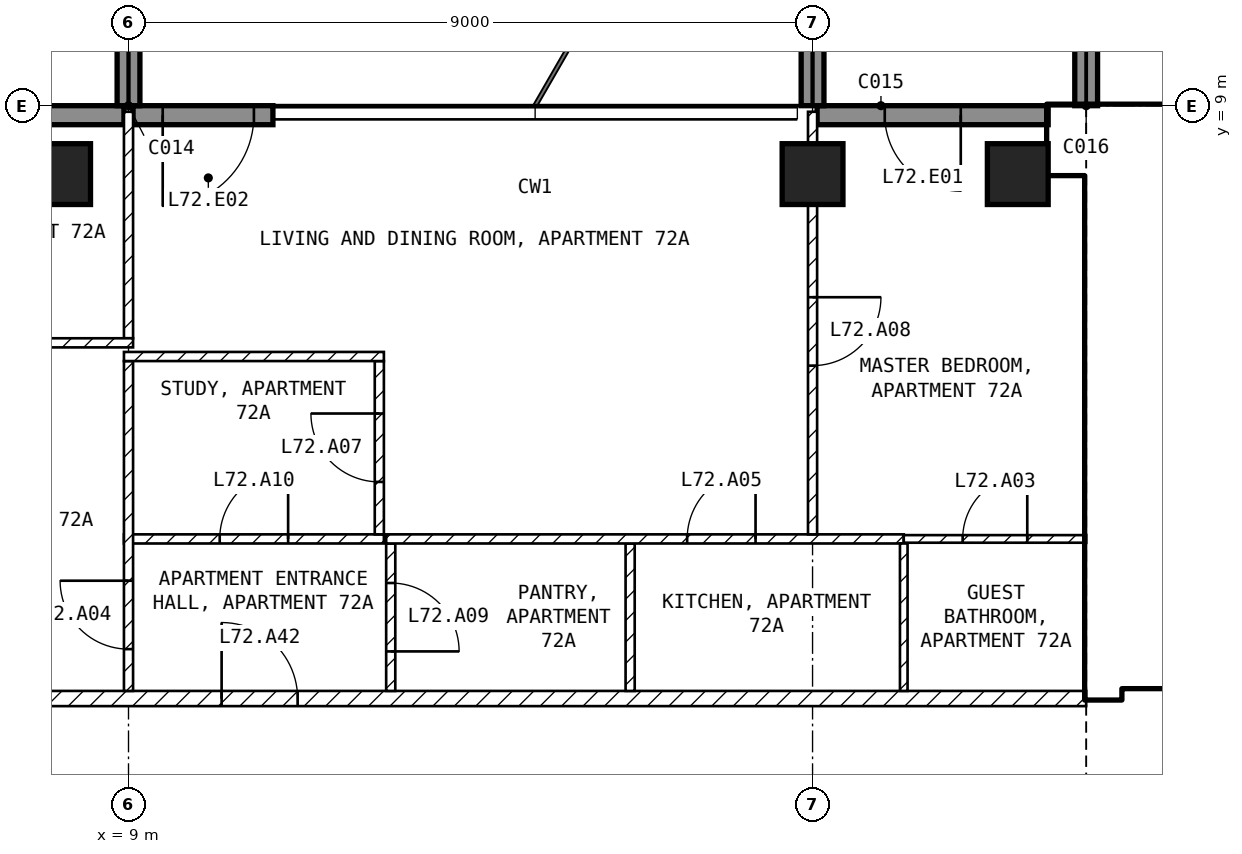
"""IFC4 building model, lengths in metres.
Left out: names, types, materials, properties, quantities, classifications, styles, units other than length and angle.
Written with IfcOpenShell. Run it as: python <this file> out.ifc"""

import sys

from ifc_helpers import new_model, si_unit, direction, frame, frame_2d, origin, origin_2d, place, context, subcontext, project, spatial, rectangle, extrude, element, fill, save


model = new_model("IFC4")
c1 = context("Model", 3, precision=1e-05, world=origin(), true_north=direction((0.0, 1.0)))
c2 = subcontext(c1, "Body", "Model", "MODEL_VIEW")
j1 = project(units=[si_unit("LENGTHUNIT", "METRE"), si_unit("PLANEANGLEUNIT", "RADIAN")], contexts=[c1])
p1 = place(None, origin())
s1 = spatial("IfcSite", under=j1, at=p1, CompositionType="ELEMENT")
p2 = place(p1, origin())
s2 = spatial("IfcBuilding", under=s1, at=p2, CompositionType="ELEMENT")
p3 = place(p2, frame((0.0, 0.0, 281.5)))
s3 = spatial("IfcBuildingStorey", under=s2, at=p3, CompositionType="ELEMENT", Elevation=281.5)
for number, where, z_axis, x_axis in (
    (1, (8.1, 8.1, -0.25), (0.0, 0.0, 1.0), (1.0, 0.0, 0.0)),
    (2, (18.0, 8.1, -0.25), (0.0, 0.0, 1.0), (1.0, 0.0, 0.0)),
    (3, (20.7, 8.1, -0.25), (0.0, 0.0, 1.0), (1.0, 0.0, 0.0)),
):
    element("IfcColumn", number, at=place(p3, frame(where, z_axis=z_axis, x_axis=x_axis)), inside=s3, PredefinedType="COLUMN", context=c2, shape_type="SweptSolid", body=[
        extrude(rectangle(XDim=0.8, YDim=0.8, at=origin_2d()), origin(), (0.0, 0.0, 1.0), 3.45),
    ])
p4 = place(p3, frame((21.1, 8.875, 0.0), z_axis=(0.0, 0.0, 1.0), x_axis=(-1.0, 0.0, 0.0)))
e4 = element("IfcWall", 4, at=p4, inside=s3, PredefinedType="SOLIDWALL", context=c2, shape_type="SweptSolid", body=[
    extrude(rectangle(XDim=3.04, YDim=0.25, at=frame_2d((1.52, 0.0))), origin(), (0.0, 0.0, 1.0), 3.2),
])
p5 = place(p4, frame((1.15, 0.0, 0.0)))
e5 = element("IfcOpeningElement", 5, at=p5, cuts=e4, PredefinedType="OPENING", context=c2, shape_type="SweptSolid", body=[
    extrude(rectangle(XDim=1.0, YDim=2.4, at=frame_2d((0.5, 1.2))), frame((0.0, 0.135, 0.0), z_axis=(0.0, -1.0, 0.0), x_axis=(1.0, 0.0, 0.0)), (0.0, 0.0, 1.0), 0.27),
])
p6 = place(p3, frame((10.9, 8.875, 0.0), z_axis=(0.0, 0.0, 1.0), x_axis=(-1.0, 0.0, 0.0)))
e6 = element("IfcWall", 6, at=p6, inside=s3, PredefinedType="SOLIDWALL", context=c2, shape_type="SweptSolid", body=[
    extrude(rectangle(XDim=1.84, YDim=0.25, at=frame_2d((0.92, 0.0))), origin(), (0.0, 0.0, 1.0), 3.2),
])
p7 = place(p6, frame((0.25, 0.0, 0.0)))
e7 = element("IfcOpeningElement", 7, at=p7, cuts=e6, PredefinedType="OPENING", context=c2, shape_type="SweptSolid", body=[
    extrude(rectangle(XDim=1.2, YDim=2.4, at=frame_2d((0.6, 1.2))), frame((0.0, 0.135, 0.0), z_axis=(0.0, -1.0, 0.0), x_axis=(1.0, 0.0, 0.0)), (0.0, 0.0, 1.0), 0.27),
])
p8 = place(p3, frame((8.94, 8.875, 0.0), z_axis=(0.0, 0.0, 1.0), x_axis=(-1.0, 0.0, 0.0)))
e8 = element("IfcWall", 8, at=p8, inside=s3, PredefinedType="SOLIDWALL", context=c2, shape_type="SweptSolid", body=[
    extrude(rectangle(XDim=3.04, YDim=0.25, at=frame_2d((1.52, 0.0))), origin(), (0.0, 0.0, 1.0), 3.2),
])
p9 = place(p8, frame((1.59, 0.0, 0.0)))
e9 = element("IfcOpeningElement", 9, at=p9, cuts=e8, PredefinedType="OPENING", context=c2, shape_type="SweptSolid", body=[
    extrude(rectangle(XDim=1.2, YDim=2.4, at=frame_2d((0.6, 1.2))), frame((0.0, 0.135, 0.0), z_axis=(0.0, -1.0, 0.0), x_axis=(1.0, 0.0, 0.0)), (0.0, 0.0, 1.0), 0.27),
])
for number, where, z_axis, x_axis in (
    (10, (9.0, 9.0, 0.0), (0.0, 0.0, 1.0), (0.0, 1.0, 0.0)),
    (11, (18.0, 9.0, 0.0), (0.0, 0.0, 1.0), (0.0, 1.0, 0.0)),
    (12, (21.6, 9.0, 0.0), (0.0, 0.0, 1.0), (0.0, 1.0, 0.0)),
):
    element("IfcWall", number, at=place(p3, frame(where, z_axis=z_axis, x_axis=x_axis)), inside=s3, PredefinedType="SOLIDWALL", context=c2, shape_type="SweptSolid", body=[
        extrude(rectangle(XDim=2.7, YDim=0.3, at=frame_2d((1.35, 0.0))), origin(), (0.0, 0.0, 1.0), 3.2),
    ])
p10 = place(p3, frame((21.1, 8.55, 0.0), z_axis=(0.0, 0.0, 1.0), x_axis=(1.0, 0.0, 0.0)))
e13 = element("IfcWall", 13, at=p10, inside=s3, PredefinedType="SHEAR", context=c2, shape_type="SweptSolid", body=[
    extrude(rectangle(XDim=8.65, YDim=0.9, at=frame_2d((4.325, 0.0))), origin(), (0.0, 0.0, 1.0), 3.2),
])
p11 = place(p3, frame((21.825, 1.2, 0.0), z_axis=(0.0, 0.0, 1.0), x_axis=(0.0, 1.0, 0.0)))
e14 = element("IfcWall", 14, at=p11, inside=s3, PredefinedType="SHEAR", context=c2, shape_type="SweptSolid", body=[
    extrude(rectangle(XDim=6.9, YDim=0.45, at=frame_2d((3.45, 0.0))), origin(), (0.0, 0.0, 1.0), 3.2),
])
p12 = place(p3, frame((22.05, 1.45, 0.0), z_axis=(0.0, 0.0, 1.0), x_axis=(1.0, 0.0, 0.0)))
e15 = element("IfcWall", 15, at=p12, inside=s3, PredefinedType="SOLIDWALL", context=c2, shape_type="SweptSolid", body=[
    extrude(rectangle(XDim=11.3, YDim=0.2, at=frame_2d((5.65, 0.0))), origin(), (0.0, 0.0, 1.0), 3.2),
])
p13 = place(p12, frame((0.75, 0.0, 0.0)))
e16 = element("IfcOpeningElement", 16, at=p13, cuts=e15, PredefinedType="OPENING", context=c2, shape_type="SweptSolid", body=[
    extrude(rectangle(XDim=1.0, YDim=2.1, at=frame_2d((0.5, 1.05))), frame((0.0, 0.11, 0.0), z_axis=(0.0, -1.0, 0.0), x_axis=(1.0, 0.0, 0.0)), (0.0, 0.0, 1.0), 0.22),
])
p14 = place(p12, frame((3.25, 0.0, 0.0)))
e17 = element("IfcOpeningElement", 17, at=p14, cuts=e15, PredefinedType="OPENING", context=c2, shape_type="SweptSolid", body=[
    extrude(rectangle(XDim=1.0, YDim=2.1, at=frame_2d((0.5, 1.05))), frame((0.0, 0.11, 0.0), z_axis=(0.0, -1.0, 0.0), x_axis=(1.0, 0.0, 0.0)), (0.0, 0.0, 1.0), 0.22),
])
p15 = place(p12, frame((9.225, 0.0, 0.0)))
e18 = element("IfcOpeningElement", 18, at=p15, cuts=e15, PredefinedType="OPENING", context=c2, shape_type="SweptSolid", body=[
    extrude(rectangle(XDim=0.9, YDim=2.1, at=frame_2d((0.45, 1.05))), frame((0.0, 0.11, 0.0), z_axis=(0.0, -1.0, 0.0), x_axis=(1.0, 0.0, 0.0)), (0.0, 0.0, 1.0), 0.22),
])
p16 = place(p3, frame((22.05, 5.15, 0.0), z_axis=(0.0, 0.0, 1.0), x_axis=(1.0, 0.0, 0.0)))
e19 = element("IfcWall", 19, at=p16, inside=s3, PredefinedType="SOLIDWALL", context=c2, shape_type="SweptSolid", body=[
    extrude(rectangle(XDim=6.3, YDim=0.2, at=frame_2d((3.15, 0.0))), origin(), (0.0, 0.0, 1.0), 3.2),
])
p17 = place(p16, frame((0.2, 0.0, 0.0)))
e20 = element("IfcOpeningElement", 20, at=p17, cuts=e19, PredefinedType="OPENING", context=c2, shape_type="SweptSolid", body=[
    extrude(rectangle(XDim=1.0, YDim=2.1, at=frame_2d((0.5, 1.05))), frame((0.0, 0.11, 0.0), z_axis=(0.0, -1.0, 0.0), x_axis=(1.0, 0.0, 0.0)), (0.0, 0.0, 1.0), 0.22),
])
p18 = place(p3, frame((4.4, 1.2, 0.0), z_axis=(0.0, 0.0, 1.0), x_axis=(1.0, 0.0, 0.0)))
e21 = element("IfcWall", 21, at=p18, inside=s3, PredefinedType="PARTITIONING", context=c2, shape_type="SweptSolid", body=[
    extrude(rectangle(XDim=17.2, YDim=0.2, at=frame_2d((8.6, 0.0))), origin(), (0.0, 0.0, 1.0), 3.2),
])
p19 = place(p18, frame((5.825, 0.0, 0.0)))
e22 = element("IfcOpeningElement", 22, at=p19, cuts=e21, PredefinedType="OPENING", context=c2, shape_type="SweptSolid", body=[
    extrude(rectangle(XDim=1.0, YDim=2.1, at=frame_2d((0.5, 1.05))), frame((0.0, 0.11, 0.0), z_axis=(0.0, -1.0, 0.0), x_axis=(1.0, 0.0, 0.0)), (0.0, 0.0, 1.0), 0.22),
])
p20 = place(p3, frame((12.45, 3.24, 0.0), z_axis=(0.0, 0.0, 1.0), x_axis=(0.0, -1.0, 0.0)))
e23 = element("IfcWall", 23, at=p20, inside=s3, PredefinedType="PARTITIONING", context=c2, shape_type="SweptSolid", body=[
    extrude(rectangle(XDim=1.94, YDim=0.12, at=frame_2d((0.97, 0.0))), origin(), (0.0, 0.0, 1.0), 3.2),
])
p21 = place(p20, frame((0.52, 0.0, 0.0)))
e24 = element("IfcOpeningElement", 24, at=p21, cuts=e23, PredefinedType="OPENING", context=c2, shape_type="SweptSolid", body=[
    extrude(rectangle(XDim=0.9, YDim=2.1, at=frame_2d((0.45, 1.05))), frame((0.0, 0.07, 0.0), z_axis=(0.0, -1.0, 0.0), x_axis=(1.0, 0.0, 0.0)), (0.0, 0.0, 1.0), 0.14),
])
p22 = place(p3, frame((8.94, 3.3, 0.0), z_axis=(0.0, 0.0, 1.0), x_axis=(1.0, 0.0, 0.0)))
e25 = element("IfcWall", 25, at=p22, inside=s3, PredefinedType="PARTITIONING", context=c2, shape_type="SweptSolid", body=[
    extrude(rectangle(XDim=3.42, YDim=0.12, at=frame_2d((1.71, 0.0))), origin(), (0.0, 0.0, 1.0), 3.2),
])
p23 = place(p22, frame((1.26, 0.0, 0.0)))
e26 = element("IfcOpeningElement", 26, at=p23, cuts=e25, PredefinedType="OPENING", context=c2, shape_type="SweptSolid", body=[
    extrude(rectangle(XDim=0.9, YDim=2.1, at=frame_2d((0.45, 1.05))), frame((0.0, 0.07, 0.0), z_axis=(0.0, -1.0, 0.0), x_axis=(1.0, 0.0, 0.0)), (0.0, 0.0, 1.0), 0.14),
])
p24 = place(p3, frame((9.0, 1.3, 0.0), z_axis=(0.0, 0.0, 1.0), x_axis=(0.0, 1.0, 0.0)))
e27 = element("IfcWall", 27, at=p24, inside=s3, PredefinedType="PARTITIONING", context=c2, shape_type="SweptSolid", body=[
    extrude(rectangle(XDim=4.34, YDim=0.12, at=frame_2d((2.17, 0.0))), origin(), (0.0, 0.0, 1.0), 3.2),
])
p25 = place(p24, frame((0.55, 0.0, 0.0)))
e28 = element("IfcOpeningElement", 28, at=p25, cuts=e27, PredefinedType="OPENING", context=c2, shape_type="SweptSolid", body=[
    extrude(rectangle(XDim=0.9, YDim=2.1, at=frame_2d((0.45, 1.05))), frame((0.0, 0.07, 0.0), z_axis=(0.0, -1.0, 0.0), x_axis=(1.0, 0.0, 0.0)), (0.0, 0.0, 1.0), 0.14),
])
p26 = place(p3, frame((15.6, 3.24, 0.0), z_axis=(0.0, 0.0, 1.0), x_axis=(0.0, -1.0, 0.0)))
e29 = element("IfcWall", 29, at=p26, inside=s3, PredefinedType="PARTITIONING", context=c2, shape_type="SweptSolid", body=[
    extrude(rectangle(XDim=1.94, YDim=0.12, at=frame_2d((0.97, 0.0))), origin(), (0.0, 0.0, 1.0), 3.2),
])
p27 = place(p3, frame((12.39, 3.3, 0.0), z_axis=(0.0, 0.0, 1.0), x_axis=(1.0, 0.0, 0.0)))
e30 = element("IfcWall", 30, at=p27, inside=s3, PredefinedType="PARTITIONING", context=c2, shape_type="SweptSolid", body=[
    extrude(rectangle(XDim=6.81, YDim=0.12, at=frame_2d((3.405, 0.0))), origin(), (0.0, 0.0, 1.0), 3.2),
])
p28 = place(p27, frame((3.96, 0.0, 0.0)))
e31 = element("IfcOpeningElement", 31, at=p28, cuts=e30, PredefinedType="OPENING", context=c2, shape_type="SweptSolid", body=[
    extrude(rectangle(XDim=0.9, YDim=2.1, at=frame_2d((0.45, 1.05))), frame((0.0, 0.07, 0.0), z_axis=(0.0, -1.0, 0.0), x_axis=(1.0, 0.0, 0.0)), (0.0, 0.0, 1.0), 0.14),
])
p29 = place(p3, frame((19.2, 3.24, 0.0), z_axis=(0.0, 0.0, 1.0), x_axis=(0.0, -1.0, 0.0)))
e32 = element("IfcWall", 32, at=p29, inside=s3, PredefinedType="PARTITIONING", context=c2, shape_type="SweptSolid", body=[
    extrude(rectangle(XDim=1.94, YDim=0.1, at=frame_2d((0.97, 0.0))), origin(), (0.0, 0.0, 1.0), 3.2),
])
p30 = place(p3, frame((19.2, 3.3, 0.0), z_axis=(0.0, 0.0, 1.0), x_axis=(1.0, 0.0, 0.0)))
e33 = element("IfcWall", 33, at=p30, inside=s3, PredefinedType="PARTITIONING", context=c2, shape_type="SweptSolid", body=[
    extrude(rectangle(XDim=2.4, YDim=0.1, at=frame_2d((1.2, 0.0))), origin(), (0.0, 0.0, 1.0), 3.2),
])
p31 = place(p30, frame((0.775, 0.0, 0.0)))
e34 = element("IfcOpeningElement", 34, at=p31, cuts=e33, PredefinedType="OPENING", context=c2, shape_type="SweptSolid", body=[
    extrude(rectangle(XDim=0.85, YDim=2.1, at=frame_2d((0.425, 1.05))), frame((0.0, 0.06, 0.0), z_axis=(0.0, -1.0, 0.0), x_axis=(1.0, 0.0, 0.0)), (0.0, 0.0, 1.0), 0.12),
])
p32 = place(p3, frame((12.3, 3.36, 0.0), z_axis=(0.0, 0.0, 1.0), x_axis=(0.0, 1.0, 0.0)))
e35 = element("IfcWall", 35, at=p32, inside=s3, PredefinedType="PARTITIONING", context=c2, shape_type="SweptSolid", body=[
    extrude(rectangle(XDim=2.28, YDim=0.12, at=frame_2d((1.14, 0.0))), origin(), (0.0, 0.0, 1.0), 3.2),
])
p33 = place(p32, frame((0.69, 0.0, 0.0)))
e36 = element("IfcOpeningElement", 36, at=p33, cuts=e35, PredefinedType="OPENING", context=c2, shape_type="SweptSolid", body=[
    extrude(rectangle(XDim=0.9, YDim=2.1, at=frame_2d((0.45, 1.05))), frame((0.0, 0.07, 0.0), z_axis=(0.0, -1.0, 0.0), x_axis=(1.0, 0.0, 0.0)), (0.0, 0.0, 1.0), 0.14),
])
p34 = place(p3, frame((12.36, 5.7, 0.0), z_axis=(0.0, 0.0, 1.0), x_axis=(-1.0, 0.0, 0.0)))
e37 = element("IfcWall", 37, at=p34, inside=s3, PredefinedType="PARTITIONING", context=c2, shape_type="SweptSolid", body=[
    extrude(rectangle(XDim=3.42, YDim=0.12, at=frame_2d((1.71, 0.0))), origin(), (0.0, 0.0, 1.0), 3.2),
])
p35 = place(p3, frame((18.0, 8.92, 0.0), z_axis=(0.0, 0.0, 1.0), x_axis=(0.0, -1.0, 0.0)))
e38 = element("IfcWall", 38, at=p35, inside=s3, PredefinedType="PARTITIONING", context=c2, shape_type="SweptSolid", body=[
    extrude(rectangle(XDim=5.56, YDim=0.12, at=frame_2d((2.78, 0.0))), origin(), (0.0, 0.0, 1.0), 2.446),
])
p36 = place(p35, frame((2.44, 0.0, 0.0)))
e39 = element("IfcOpeningElement", 39, at=p36, cuts=e38, PredefinedType="OPENING", context=c2, shape_type="SweptSolid", body=[
    extrude(rectangle(XDim=0.9, YDim=2.1, at=frame_2d((0.45, 1.05))), frame((0.0, 0.07, 0.0), z_axis=(0.0, -1.0, 0.0), x_axis=(1.0, 0.0, 0.0)), (0.0, 0.0, 1.0), 0.14),
])
p37 = place(p3, frame((9.0, 5.94, 0.0), z_axis=(0.0, 0.0, 1.0), x_axis=(0.0, 1.0, 0.0)))
e40 = element("IfcWall", 40, at=p37, inside=s3, PredefinedType="PARTITIONING", context=c2, shape_type="SweptSolid", body=[
    extrude(rectangle(XDim=2.98, YDim=0.12, at=frame_2d((1.49, 0.0))), origin(), (0.0, 0.0, 1.0), 3.2),
])
p38 = place(p3, frame((4.44, 5.88, 0.0), z_axis=(0.0, 0.0, 1.0), x_axis=(1.0, 0.0, 0.0)))
e41 = element("IfcWall", 41, at=p38, inside=s3, PredefinedType="PARTITIONING", context=c2, shape_type="SweptSolid", body=[
    extrude(rectangle(XDim=4.62, YDim=0.12, at=frame_2d((2.31, 0.0))), origin(), (0.0, 0.0, 1.0), 3.2),
])
p39 = place(p38, frame((1.86, 0.0, 0.0)))
e42 = element("IfcOpeningElement", 42, at=p39, cuts=e41, PredefinedType="OPENING", context=c2, shape_type="SweptSolid", body=[
    extrude(rectangle(XDim=0.9, YDim=2.1, at=frame_2d((0.45, 1.05))), frame((0.0, 0.07, 0.0), z_axis=(0.0, -1.0, 0.0), x_axis=(1.0, 0.0, 0.0)), (0.0, 0.0, 1.0), 0.14),
])
p40 = place(p5, origin())
e43 = element("IfcDoor", 43, at=p40, inside=s3, OperationType="SINGLE_SWING_LEFT", PredefinedType="DOOR", context=c2, shape_type="SweptSolid", body=[
    extrude(rectangle(XDim=1.0, YDim=2.4, at=frame_2d((0.5, 1.2))), frame((0.0, 0.025, 0.0), z_axis=(0.0, -1.0, 0.0), x_axis=(1.0, 0.0, 0.0)), (0.0, 0.0, 1.0), 0.05),
])
fill(e5, e43)
p41 = place(p7, origin())
e44 = element("IfcDoor", 44, at=p41, inside=s3, OperationType="SINGLE_SWING_RIGHT", PredefinedType="DOOR", context=c2, shape_type="SweptSolid", body=[
    extrude(rectangle(XDim=1.2, YDim=2.4, at=frame_2d((0.6, 1.2))), frame((0.0, 0.025, 0.0), z_axis=(0.0, -1.0, 0.0), x_axis=(1.0, 0.0, 0.0)), (0.0, 0.0, 1.0), 0.05),
])
fill(e7, e44)
p42 = place(p17, origin())
e45 = element("IfcDoor", 45, at=p42, inside=s3, OperationType="SINGLE_SWING_LEFT", PredefinedType="DOOR", context=c2, shape_type="SweptSolid", body=[
    extrude(rectangle(XDim=1.0, YDim=2.1, at=frame_2d((0.5, 1.05))), frame((0.0, 0.025, 0.0), z_axis=(0.0, -1.0, 0.0), x_axis=(1.0, 0.0, 0.0)), (0.0, 0.0, 1.0), 0.05),
])
fill(e20, e45)
p43 = place(p31, origin())
e46 = element("IfcDoor", 46, at=p43, inside=s3, OperationType="SINGLE_SWING_RIGHT", PredefinedType="DOOR", context=c2, shape_type="SweptSolid", body=[
    extrude(rectangle(XDim=0.85, YDim=2.1, at=frame_2d((0.425, 1.05))), frame((0.0, 0.025, 0.0), z_axis=(0.0, -1.0, 0.0), x_axis=(1.0, 0.0, 0.0)), (0.0, 0.0, 1.0), 0.05),
])
fill(e34, e46)
p44 = place(p25, origin())
e47 = element("IfcDoor", 47, at=p44, inside=s3, OperationType="SINGLE_SWING_RIGHT", PredefinedType="DOOR", context=c2, shape_type="SweptSolid", body=[
    extrude(rectangle(XDim=0.9, YDim=2.1, at=frame_2d((0.45, 1.05))), frame((0.0, 0.025, 0.0), z_axis=(0.0, -1.0, 0.0), x_axis=(1.0, 0.0, 0.0)), (0.0, 0.0, 1.0), 0.05),
])
fill(e28, e47)
p45 = place(p28, origin())
e48 = element("IfcDoor", 48, at=p45, inside=s3, OperationType="SINGLE_SWING_RIGHT", PredefinedType="DOOR", context=c2, shape_type="SweptSolid", body=[
    extrude(rectangle(XDim=0.9, YDim=2.1, at=frame_2d((0.45, 1.05))), frame((0.0, 0.025, 0.0), z_axis=(0.0, -1.0, 0.0), x_axis=(1.0, 0.0, 0.0)), (0.0, 0.0, 1.0), 0.05),
])
fill(e31, e48)
p46 = place(p33, origin())
e49 = element("IfcDoor", 49, at=p46, inside=s3, OperationType="SINGLE_SWING_RIGHT", PredefinedType="DOOR", context=c2, shape_type="SweptSolid", body=[
    extrude(rectangle(XDim=0.9, YDim=2.1, at=frame_2d((0.45, 1.05))), frame((0.0, 0.025, 0.0), z_axis=(0.0, -1.0, 0.0), x_axis=(1.0, 0.0, 0.0)), (0.0, 0.0, 1.0), 0.05),
])
fill(e36, e49)
p47 = place(p36, origin())
e50 = element("IfcDoor", 50, at=p47, inside=s3, OperationType="SINGLE_SWING_LEFT", PredefinedType="DOOR", context=c2, shape_type="SweptSolid", body=[
    extrude(rectangle(XDim=0.9, YDim=2.1, at=frame_2d((0.45, 1.05))), frame((0.0, 0.025, 0.0), z_axis=(0.0, -1.0, 0.0), x_axis=(1.0, 0.0, 0.0)), (0.0, 0.0, 1.0), 0.05),
])
fill(e39, e50)
p48 = place(p21, origin())
e51 = element("IfcDoor", 51, at=p48, inside=s3, OperationType="SINGLE_SWING_RIGHT", PredefinedType="DOOR", context=c2, shape_type="SweptSolid", body=[
    extrude(rectangle(XDim=0.9, YDim=2.1, at=frame_2d((0.45, 1.05))), frame((0.0, 0.025, 0.0), z_axis=(0.0, -1.0, 0.0), x_axis=(1.0, 0.0, 0.0)), (0.0, 0.0, 1.0), 0.05),
])
fill(e24, e51)
p49 = place(p23, origin())
e52 = element("IfcDoor", 52, at=p49, inside=s3, OperationType="SINGLE_SWING_RIGHT", PredefinedType="DOOR", context=c2, shape_type="SweptSolid", body=[
    extrude(rectangle(XDim=0.9, YDim=2.1, at=frame_2d((0.45, 1.05))), frame((0.0, 0.025, 0.0), z_axis=(0.0, -1.0, 0.0), x_axis=(1.0, 0.0, 0.0)), (0.0, 0.0, 1.0), 0.05),
])
fill(e26, e52)
p50 = place(p19, origin())
e53 = element("IfcDoor", 53, at=p50, inside=s3, OperationType="SINGLE_SWING_LEFT", PredefinedType="DOOR", context=c2, shape_type="SweptSolid", body=[
    extrude(rectangle(XDim=1.0, YDim=2.1, at=frame_2d((0.5, 1.05))), frame((0.0, 0.025, 0.0), z_axis=(0.0, -1.0, 0.0), x_axis=(1.0, 0.0, 0.0)), (0.0, 0.0, 1.0), 0.05),
])
fill(e22, e53)
save(model, sys.argv[1])
